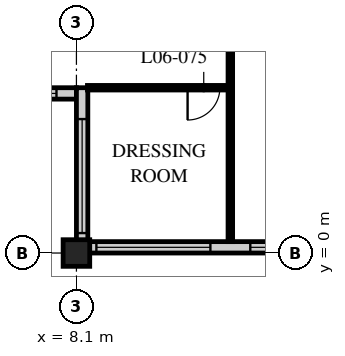
"""IFC4 building model, lengths in metres.
Left out: names, types, materials, properties, quantities, classifications, styles, units other than length and angle.
Written with IfcOpenShell. Run it as: python <this file> out.ifc"""

import sys

from ifc_helpers import new_model, si_unit, direction, frame, frame_2d, origin, origin_2d, place, context, subcontext, project, spatial, rectangle, hollow_rectangle, extrude, element, fill, save


model = new_model("IFC4")
c1 = context("Model", 3, precision=1e-05, world=origin(), true_north=direction((0.0, 1.0)))
c2 = subcontext(c1, "Body", "Model", "MODEL_VIEW")
j1 = project(units=[si_unit("LENGTHUNIT", "METRE"), si_unit("PLANEANGLEUNIT", "RADIAN")], contexts=[c1])
p1 = place(None, origin())
s1 = spatial("IfcSite", under=j1, at=p1, CompositionType="ELEMENT")
p2 = place(p1, origin())
s2 = spatial("IfcBuilding", under=s1, at=p2, CompositionType="ELEMENT")
p3 = place(p2, frame((0.0, 0.0, 33.0)))
s3 = spatial("IfcBuildingStorey", under=s2, at=p3, CompositionType="ELEMENT", Elevation=33.0)
p4 = place(p3, frame((8.1, 0.0, 0.0), z_axis=(0.0, 0.0, 1.0), x_axis=(1.0, 0.0, 0.0)))
e1 = element("IfcColumn", 1, at=p4, inside=s3, PredefinedType="COLUMN", context=c2, shape_type="SweptSolid", body=[
    extrude(hollow_rectangle(XDim=0.7, YDim=0.7, WallThickness=0.06, at=origin_2d()), origin(), (0.0, 0.0, 1.0), 3.4),
])
p5 = place(p3, frame((8.4, 0.15, 0.0), z_axis=(0.0, 0.0, 1.0), x_axis=(1.0, 0.0, 0.0)))
e2 = element("IfcWall", 2, at=p5, inside=s3, PredefinedType="SOLIDWALL", context=c2, shape_type="SweptSolid", body=[
    extrude(rectangle(XDim=40.2, YDim=0.3, at=frame_2d((20.1, 0.0))), origin(), (0.0, 0.0, 1.0), 3.19),
])
p6 = place(p5, frame((0.225, 0.0, 0.9)))
e3 = element("IfcOpeningElement", 3, at=p6, cuts=e2, PredefinedType="OPENING", context=c2, shape_type="SweptSolid", body=[
    extrude(rectangle(XDim=3.0, YDim=2.0, at=frame_2d((1.5, 1.0))), frame((0.0, 0.16, 0.0), z_axis=(0.0, -1.0, 0.0), x_axis=(1.0, 0.0, 0.0)), (0.0, 0.0, 1.0), 0.32),
])
p7 = place(p5, frame((4.275, 0.0, 0.9)))
e4 = element("IfcOpeningElement", 4, at=p7, cuts=e2, PredefinedType="OPENING", context=c2, shape_type="SweptSolid", body=[
    extrude(rectangle(XDim=3.0, YDim=2.0, at=frame_2d((1.5, 1.0))), frame((0.0, 0.16, 0.0), z_axis=(0.0, -1.0, 0.0), x_axis=(1.0, 0.0, 0.0)), (0.0, 0.0, 1.0), 0.32),
])
p8 = place(p5, frame((8.325, 0.0, 0.9)))
e5 = element("IfcOpeningElement", 5, at=p8, cuts=e2, PredefinedType="OPENING", context=c2, shape_type="SweptSolid", body=[
    extrude(rectangle(XDim=3.0, YDim=2.0, at=frame_2d((1.5, 1.0))), frame((0.0, 0.16, 0.0), z_axis=(0.0, -1.0, 0.0), x_axis=(1.0, 0.0, 0.0)), (0.0, 0.0, 1.0), 0.32),
])
p9 = place(p5, frame((12.375, 0.0, 0.9)))
e6 = element("IfcOpeningElement", 6, at=p9, cuts=e2, PredefinedType="OPENING", context=c2, shape_type="SweptSolid", body=[
    extrude(rectangle(XDim=3.0, YDim=2.0, at=frame_2d((1.5, 1.0))), frame((0.0, 0.16, 0.0), z_axis=(0.0, -1.0, 0.0), x_axis=(1.0, 0.0, 0.0)), (0.0, 0.0, 1.0), 0.32),
])
p10 = place(p5, frame((16.425, 0.0, 0.9)))
e7 = element("IfcOpeningElement", 7, at=p10, cuts=e2, PredefinedType="OPENING", context=c2, shape_type="SweptSolid", body=[
    extrude(rectangle(XDim=3.0, YDim=2.0, at=frame_2d((1.5, 1.0))), frame((0.0, 0.16, 0.0), z_axis=(0.0, -1.0, 0.0), x_axis=(1.0, 0.0, 0.0)), (0.0, 0.0, 1.0), 0.32),
])
p11 = place(p5, frame((20.475, 0.0, 0.9)))
e8 = element("IfcOpeningElement", 8, at=p11, cuts=e2, PredefinedType="OPENING", context=c2, shape_type="SweptSolid", body=[
    extrude(rectangle(XDim=3.0, YDim=2.0, at=frame_2d((1.5, 1.0))), frame((0.0, 0.16, 0.0), z_axis=(0.0, -1.0, 0.0), x_axis=(1.0, 0.0, 0.0)), (0.0, 0.0, 1.0), 0.32),
])
p12 = place(p5, frame((24.525, 0.0, 0.9)))
e9 = element("IfcOpeningElement", 9, at=p12, cuts=e2, PredefinedType="OPENING", context=c2, shape_type="SweptSolid", body=[
    extrude(rectangle(XDim=3.0, YDim=2.0, at=frame_2d((1.5, 1.0))), frame((0.0, 0.16, 0.0), z_axis=(0.0, -1.0, 0.0), x_axis=(1.0, 0.0, 0.0)), (0.0, 0.0, 1.0), 0.32),
])
p13 = place(p5, frame((28.575, 0.0, 0.9)))
e10 = element("IfcOpeningElement", 10, at=p13, cuts=e2, PredefinedType="OPENING", context=c2, shape_type="SweptSolid", body=[
    extrude(rectangle(XDim=3.0, YDim=2.0, at=frame_2d((1.5, 1.0))), frame((0.0, 0.16, 0.0), z_axis=(0.0, -1.0, 0.0), x_axis=(1.0, 0.0, 0.0)), (0.0, 0.0, 1.0), 0.32),
])
p14 = place(p5, frame((32.625, 0.0, 0.9)))
e11 = element("IfcOpeningElement", 11, at=p14, cuts=e2, PredefinedType="OPENING", context=c2, shape_type="SweptSolid", body=[
    extrude(rectangle(XDim=3.0, YDim=2.0, at=frame_2d((1.5, 1.0))), frame((0.0, 0.16, 0.0), z_axis=(0.0, -1.0, 0.0), x_axis=(1.0, 0.0, 0.0)), (0.0, 0.0, 1.0), 0.32),
])
p15 = place(p5, frame((36.675, 0.0, 0.9)))
e12 = element("IfcOpeningElement", 12, at=p15, cuts=e2, PredefinedType="OPENING", context=c2, shape_type="SweptSolid", body=[
    extrude(rectangle(XDim=3.0, YDim=2.0, at=frame_2d((1.5, 1.0))), frame((0.0, 0.16, 0.0), z_axis=(0.0, -1.0, 0.0), x_axis=(1.0, 0.0, 0.0)), (0.0, 0.0, 1.0), 0.32),
])
p16 = place(p3, frame((4.35, 4.2, 0.0), z_axis=(0.0, 0.0, 1.0), x_axis=(1.0, 0.0, 0.0)))
e13 = element("IfcWall", 13, at=p16, inside=s3, PredefinedType="SOLIDWALL", context=c2, shape_type="SweptSolid", body=[
    extrude(rectangle(XDim=3.75, YDim=0.3, at=frame_2d((1.875, 0.0))), origin(), (0.0, 0.0, 1.0), 3.19),
])
p17 = place(p16, frame((0.225, 0.0, 0.9)))
e14 = element("IfcOpeningElement", 14, at=p17, cuts=e13, PredefinedType="OPENING", context=c2, shape_type="SweptSolid", body=[
    extrude(rectangle(XDim=3.0, YDim=1.5, at=frame_2d((1.5, 0.75))), frame((0.0, 0.16, 0.0), z_axis=(0.0, -1.0, 0.0), x_axis=(1.0, 0.0, 0.0)), (0.0, 0.0, 1.0), 0.32),
])
p18 = place(p3, frame((8.25, 4.35, 0.0), z_axis=(0.0, 0.0, 1.0), x_axis=(0.0, -1.0, 0.0)))
e15 = element("IfcWall", 15, at=p18, inside=s3, PredefinedType="SOLIDWALL", context=c2, shape_type="SweptSolid", body=[
    extrude(rectangle(XDim=4.35, YDim=0.3, at=frame_2d((2.175, 0.0))), origin(), (0.0, 0.0, 1.0), 3.19),
])
p19 = place(p18, frame((0.825, 0.0, 0.9)))
e16 = element("IfcOpeningElement", 16, at=p19, cuts=e15, PredefinedType="OPENING", context=c2, shape_type="SweptSolid", body=[
    extrude(rectangle(XDim=3.0, YDim=1.5, at=frame_2d((1.5, 0.75))), frame((0.0, 0.16, 0.0), z_axis=(0.0, -1.0, 0.0), x_axis=(1.0, 0.0, 0.0)), (0.0, 0.0, 1.0), 0.32),
])
p20 = place(p3, frame((12.15, 13.8, 0.0), z_axis=(0.0, 0.0, 1.0), x_axis=(0.0, -1.0, 0.0)))
e17 = element("IfcWall", 17, at=p20, inside=s3, PredefinedType="PARTITIONING", context=c2, shape_type="SweptSolid", body=[
    extrude(rectangle(XDim=13.5, YDim=0.12, at=frame_2d((6.75, 0.0))), origin(), (0.0, 0.0, 1.0), 3.19),
])
p21 = place(p3, frame((8.39, 4.35, 0.0), z_axis=(0.0, 0.0, 1.0), x_axis=(1.0, 0.0, 0.0)))
e18 = element("IfcWall", 18, at=p21, inside=s3, PredefinedType="PARTITIONING", context=c2, shape_type="SweptSolid", body=[
    extrude(rectangle(XDim=3.76, YDim=0.12, at=frame_2d((1.88, 0.0))), origin(), (0.0, 0.0, 1.0), 3.19),
])
p22 = place(p21, frame((2.635, 0.0, 0.0)))
e19 = element("IfcOpeningElement", 19, at=p22, cuts=e18, PredefinedType="OPENING", context=c2, shape_type="SweptSolid", body=[
    extrude(rectangle(XDim=0.85, YDim=2.1, at=frame_2d((0.425, 1.05))), frame((0.0, 0.07, 0.0), z_axis=(0.0, -1.0, 0.0), x_axis=(1.0, 0.0, 0.0)), (0.0, 0.0, 1.0), 0.14),
])
p23 = place(p6, origin())
e20 = element("IfcWindow", 20, at=p23, inside=s3, PartitioningType="SINGLE_PANEL", PredefinedType="WINDOW", context=c2, shape_type="SweptSolid", body=[
    extrude(rectangle(XDim=3.0, YDim=2.0, at=frame_2d((1.5, 1.0))), frame((0.0, 0.03, 0.0), z_axis=(0.0, -1.0, 0.0), x_axis=(1.0, 0.0, 0.0)), (0.0, 0.0, 1.0), 0.06),
])
fill(e3, e20)
p24 = place(p7, origin())
e21 = element("IfcWindow", 21, at=p24, inside=s3, PartitioningType="SINGLE_PANEL", PredefinedType="WINDOW", context=c2, shape_type="SweptSolid", body=[
    extrude(rectangle(XDim=3.0, YDim=2.0, at=frame_2d((1.5, 1.0))), frame((0.0, 0.03, 0.0), z_axis=(0.0, -1.0, 0.0), x_axis=(1.0, 0.0, 0.0)), (0.0, 0.0, 1.0), 0.06),
])
fill(e4, e21)
p25 = place(p17, origin())
e22 = element("IfcWindow", 22, at=p25, inside=s3, PartitioningType="SINGLE_PANEL", PredefinedType="WINDOW", context=c2, shape_type="SweptSolid", body=[
    extrude(rectangle(XDim=3.0, YDim=1.5, at=frame_2d((1.5, 0.75))), frame((0.0, 0.03, 0.0), z_axis=(0.0, -1.0, 0.0), x_axis=(1.0, 0.0, 0.0)), (0.0, 0.0, 1.0), 0.06),
])
fill(e14, e22)
p26 = place(p19, origin())
e23 = element("IfcWindow", 23, at=p26, inside=s3, PartitioningType="SINGLE_PANEL", PredefinedType="WINDOW", context=c2, shape_type="SweptSolid", body=[
    extrude(rectangle(XDim=3.0, YDim=1.5, at=frame_2d((1.5, 0.75))), frame((0.0, 0.03, 0.0), z_axis=(0.0, -1.0, 0.0), x_axis=(1.0, 0.0, 0.0)), (0.0, 0.0, 1.0), 0.06),
])
fill(e16, e23)
p27 = place(p22, origin())
e24 = element("IfcDoor", 24, at=p27, inside=s3, OperationType="SINGLE_SWING_RIGHT", PredefinedType="DOOR", context=c2, shape_type="SweptSolid", body=[
    extrude(rectangle(XDim=0.85, YDim=2.1, at=frame_2d((0.425, 1.05))), frame((0.0, 0.025, 0.0), z_axis=(0.0, -1.0, 0.0), x_axis=(1.0, 0.0, 0.0)), (0.0, 0.0, 1.0), 0.05),
])
fill(e19, e24)
save(model, sys.argv[1])
